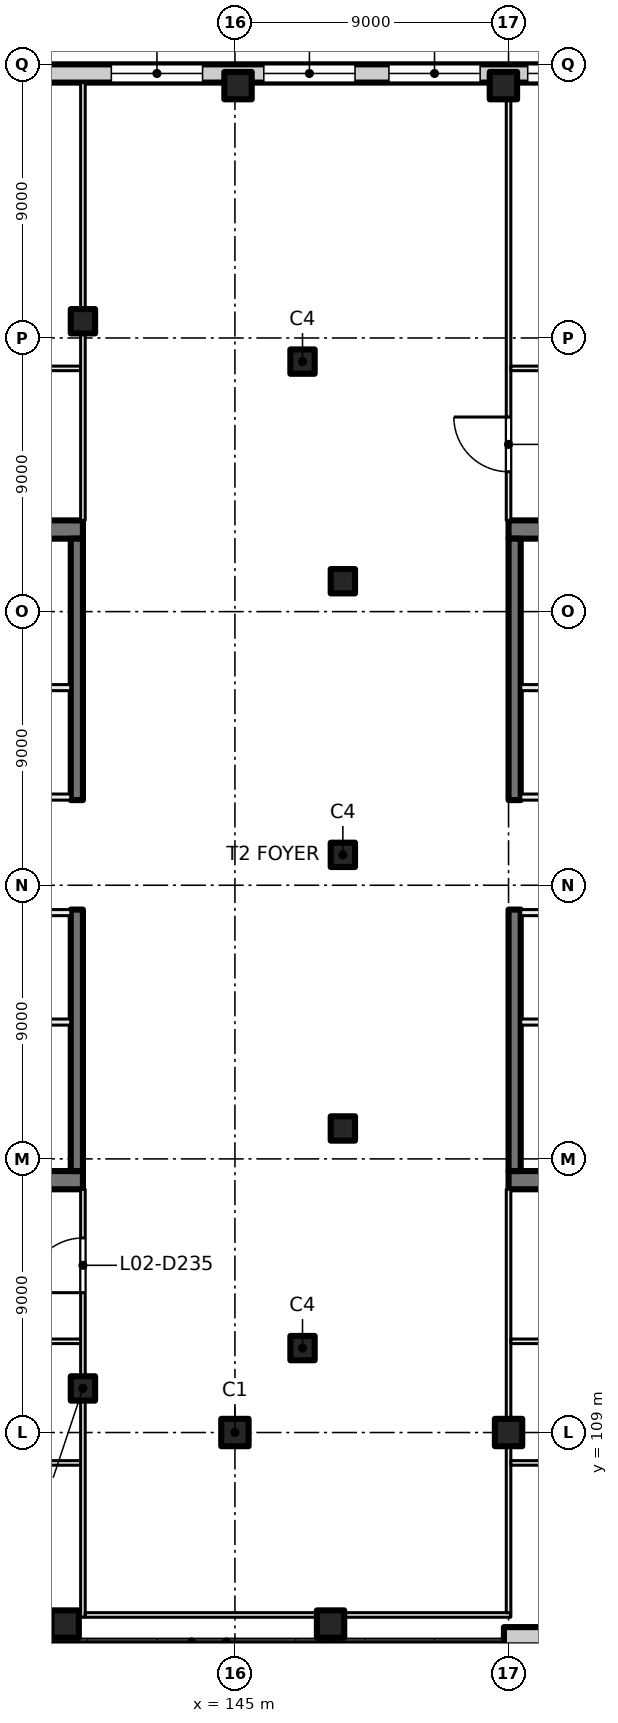
"""IFC4 building model, lengths in metres.
Left out: names, types, materials, properties, quantities, classifications, styles, units other than length and angle.
Written with IfcOpenShell. Run it as: python <this file> out.ifc"""

import sys

from ifc_helpers import new_model, si_unit, direction, frame, frame_2d, origin, origin_2d, place, context, subcontext, project, spatial, rectangle, extrude, element, fill, save


model = new_model("IFC4")
c1 = context("Model", 3, precision=1e-05, world=origin(), true_north=direction((0.0, 1.0)))
c2 = subcontext(c1, "Body", "Model", "MODEL_VIEW")
j1 = project(units=[si_unit("LENGTHUNIT", "METRE"), si_unit("PLANEANGLEUNIT", "RADIAN")], contexts=[c1])
p1 = place(None, origin())
s1 = spatial("IfcSite", under=j1, at=p1, CompositionType="ELEMENT")
p2 = place(p1, origin())
s2 = spatial("IfcBuilding", under=s1, at=p2, CompositionType="ELEMENT")
p3 = place(p2, frame((0.0, 0.0, 12.5)))
s3 = spatial("IfcBuildingStorey", under=s2, at=p3, CompositionType="ELEMENT", Elevation=12.5)
for number, where, z_axis, x_axis in (
    (1, (145.0, 109.0, 0.0), (0.0, 0.0, 1.0), (1.0, 0.0, 0.0)),
    (2, (154.0, 109.0, 0.0), (0.0, 0.0, 1.0), (1.0, 0.0, 0.0)),
    (3, (145.102, 153.3, 0.0), (0.0, 0.0, 1.0), (1.0, 0.0, 0.0)),
    (4, (153.831, 153.3, 0.0), (0.0, 0.0, 1.0), (1.0, 0.0, 0.0)),
    (5, (148.146, 102.7, 0.0), (0.0, 0.0, 1.0), (1.0, 0.0, 0.0)),
    (6, (139.416, 102.7, 0.0), (0.0, 0.0, 1.0), (1.0, 0.0, 0.0)),
):
    element("IfcColumn", number, at=place(p3, frame(where, z_axis=z_axis, x_axis=x_axis)), inside=s3, PredefinedType="COLUMN", context=c2, shape_type="SweptSolid", body=[
        extrude(rectangle(XDim=0.9, YDim=0.9, at=origin_2d()), origin(), (0.0, 0.0, 1.0), 5.0),
    ])
for number, where, z_axis, x_axis in (
    (7, (148.55, 119.0, 0.0), (0.0, 0.0, 1.0), (1.0, 0.0, 0.0)),
    (8, (148.55, 128.0, 0.0), (0.0, 0.0, 1.0), (1.0, 0.0, 0.0)),
    (9, (148.55, 137.0, 0.0), (0.0, 0.0, 1.0), (1.0, 0.0, 0.0)),
    (10, (140.0, 145.55, 0.0), (0.0, 0.0, 1.0), (1.0, 0.0, 0.0)),
    (11, (147.223, 144.223, 0.0), (0.0, 0.0, 1.0), (1.0, 0.0, 0.0)),
    (12, (140.0, 110.45, 0.0), (0.0, 0.0, 1.0), (1.0, 0.0, 0.0)),
    (13, (147.223, 111.777, 0.0), (0.0, 0.0, 1.0), (1.0, 0.0, 0.0)),
):
    element("IfcColumn", number, at=place(p3, frame(where, z_axis=z_axis, x_axis=x_axis)), inside=s3, PredefinedType="COLUMN", context=c2, shape_type="SweptSolid", body=[
        extrude(rectangle(XDim=0.8, YDim=0.8, at=origin_2d()), origin(), (0.0, 0.0, 1.0), 5.0),
    ])
for number, where, z_axis, x_axis in (
    (14, (135.4, 117.3, 0.0), (0.0, 0.0, 1.0), (1.0, 0.0, 0.0)),
    (15, (135.4, 138.7, 0.0), (0.0, 0.0, 1.0), (1.0, 0.0, 0.0)),
):
    element("IfcWall", number, at=place(p3, frame(where, z_axis=z_axis, x_axis=x_axis)), inside=s3, PredefinedType="SHEAR", context=c2, shape_type="SweptSolid", body=[
        extrude(rectangle(XDim=4.6, YDim=0.6, at=frame_2d((2.3, 0.0))), origin(), (0.0, 0.0, 1.0), 5.0),
    ])
for number, where, z_axis, x_axis in (
    (16, (139.8, 117.6, 0.0), (0.0, 0.0, 1.0), (0.0, 1.0, 0.0)),
    (17, (139.8, 129.8, 0.0), (0.0, 0.0, 1.0), (0.0, 1.0, 0.0)),
):
    element("IfcWall", number, at=place(p3, frame(where, z_axis=z_axis, x_axis=x_axis)), inside=s3, PredefinedType="SHEAR", context=c2, shape_type="SweptSolid", body=[
        extrude(rectangle(XDim=8.6, YDim=0.4, at=frame_2d((4.3, 0.0))), origin(), (0.0, 0.0, 1.0), 5.0),
    ])
for number, where, z_axis, x_axis in (
    (18, (158.6, 138.7, 0.0), (0.0, 0.0, 1.0), (-1.0, 0.0, 0.0)),
    (19, (158.6, 117.3, 0.0), (0.0, 0.0, 1.0), (-1.0, 0.0, 0.0)),
):
    element("IfcWall", number, at=place(p3, frame(where, z_axis=z_axis, x_axis=x_axis)), inside=s3, PredefinedType="SHEAR", context=c2, shape_type="SweptSolid", body=[
        extrude(rectangle(XDim=4.6, YDim=0.6, at=frame_2d((2.3, 0.0))), origin(), (0.0, 0.0, 1.0), 5.0),
    ])
for number, where, z_axis, x_axis in (
    (20, (154.2, 138.4, 0.0), (0.0, 0.0, 1.0), (0.0, -1.0, 0.0)),
    (21, (154.2, 126.2, 0.0), (0.0, 0.0, 1.0), (0.0, -1.0, 0.0)),
):
    element("IfcWall", number, at=place(p3, frame(where, z_axis=z_axis, x_axis=x_axis)), inside=s3, PredefinedType="SHEAR", context=c2, shape_type="SweptSolid", body=[
        extrude(rectangle(XDim=8.6, YDim=0.4, at=frame_2d((4.3, 0.0))), origin(), (0.0, 0.0, 1.0), 5.0),
    ])
p4 = place(p3, frame((162.978, 102.3, 0.0), z_axis=(0.0, 0.0, 1.0), x_axis=(-1.0, 0.0, 0.0)))
e22 = element("IfcWall", 22, at=p4, inside=s3, PredefinedType="SOLIDWALL", context=c2, shape_type="SweptSolid", body=[
    extrude(rectangle(XDim=9.13, YDim=0.6, at=frame_2d((4.565, 0.0))), origin(), (0.0, 0.0, 1.0), 4.6),
])
p5 = place(p4, frame((0.783, 0.0, 0.9)))
e23 = element("IfcOpeningElement", 23, at=p5, cuts=e22, PredefinedType="OPENING", context=c2, shape_type="SweptSolid", body=[
    extrude(rectangle(XDim=3.0, YDim=3.0, at=frame_2d((1.5, 1.5))), frame((0.0, 0.31, 0.0), z_axis=(0.0, -1.0, 0.0), x_axis=(1.0, 0.0, 0.0)), (0.0, 0.0, 1.0), 0.62),
])
p6 = place(p3, frame((131.022, 153.7, 0.0), z_axis=(0.0, 0.0, 1.0), x_axis=(1.0, 0.0, 0.0)))
e24 = element("IfcWall", 24, at=p6, inside=s3, PredefinedType="SOLIDWALL", context=c2, shape_type="SweptSolid", body=[
    extrude(rectangle(XDim=31.957, YDim=0.6, at=frame_2d((15.978, 0.0))), origin(), (0.0, 0.0, 1.0), 4.6),
])
p7 = place(p6, frame((0.783, 0.0, 0.9)))
e25 = element("IfcOpeningElement", 25, at=p7, cuts=e24, PredefinedType="OPENING", context=c2, shape_type="SweptSolid", body=[
    extrude(rectangle(XDim=3.0, YDim=3.0, at=frame_2d((1.5, 1.5))), frame((0.0, 0.31, 0.0), z_axis=(0.0, -1.0, 0.0), x_axis=(1.0, 0.0, 0.0)), (0.0, 0.0, 1.0), 0.62),
])
p8 = place(p6, frame((9.913, 0.0, 0.9)))
e26 = element("IfcOpeningElement", 26, at=p8, cuts=e24, PredefinedType="OPENING", context=c2, shape_type="SweptSolid", body=[
    extrude(rectangle(XDim=3.0, YDim=3.0, at=frame_2d((1.5, 1.5))), frame((0.0, 0.31, 0.0), z_axis=(0.0, -1.0, 0.0), x_axis=(1.0, 0.0, 0.0)), (0.0, 0.0, 1.0), 0.62),
])
p9 = place(p6, frame((14.928, 0.0, 0.9)))
e27 = element("IfcOpeningElement", 27, at=p9, cuts=e24, PredefinedType="OPENING", context=c2, shape_type="SweptSolid", body=[
    extrude(rectangle(XDim=3.0, YDim=3.0, at=frame_2d((1.5, 1.5))), frame((0.0, 0.31, 0.0), z_axis=(0.0, -1.0, 0.0), x_axis=(1.0, 0.0, 0.0)), (0.0, 0.0, 1.0), 0.62),
])
p10 = place(p6, frame((19.043, 0.0, 0.9)))
e28 = element("IfcOpeningElement", 28, at=p10, cuts=e24, PredefinedType="OPENING", context=c2, shape_type="SweptSolid", body=[
    extrude(rectangle(XDim=3.0, YDim=3.0, at=frame_2d((1.5, 1.5))), frame((0.0, 0.31, 0.0), z_axis=(0.0, -1.0, 0.0), x_axis=(1.0, 0.0, 0.0)), (0.0, 0.0, 1.0), 0.62),
])
p11 = place(p6, frame((23.609, 0.0, 0.9)))
e29 = element("IfcOpeningElement", 29, at=p11, cuts=e24, PredefinedType="OPENING", context=c2, shape_type="SweptSolid", body=[
    extrude(rectangle(XDim=3.0, YDim=3.0, at=frame_2d((1.5, 1.5))), frame((0.0, 0.31, 0.0), z_axis=(0.0, -1.0, 0.0), x_axis=(1.0, 0.0, 0.0)), (0.0, 0.0, 1.0), 0.62),
])
p12 = place(p6, frame((27.724, 0.0, 0.9)))
e30 = element("IfcOpeningElement", 30, at=p12, cuts=e24, PredefinedType="OPENING", context=c2, shape_type="SweptSolid", body=[
    extrude(rectangle(XDim=3.0, YDim=3.0, at=frame_2d((1.5, 1.5))), frame((0.0, 0.31, 0.0), z_axis=(0.0, -1.0, 0.0), x_axis=(1.0, 0.0, 0.0)), (0.0, 0.0, 1.0), 0.62),
])
p13 = place(p3, frame((135.0, 129.9, 0.0), z_axis=(0.0, 0.0, 1.0), x_axis=(1.0, 0.0, 0.0)))
e31 = element("IfcWall", 31, at=p13, inside=s3, PredefinedType="PARTITIONING", context=c2, shape_type="SweptSolid", body=[
    extrude(rectangle(XDim=4.6, YDim=0.2, at=frame_2d((2.3, 0.0))), origin(), (0.0, 0.0, 1.0), 4.6),
])
p14 = place(p13, frame((1.7, 0.0, 0.0)))
e32 = element("IfcOpeningElement", 32, at=p14, cuts=e31, PredefinedType="OPENING", context=c2, shape_type="SweptSolid", body=[
    extrude(rectangle(XDim=1.2, YDim=2.1, at=frame_2d((0.6, 1.05))), frame((0.0, 0.11, 0.0), z_axis=(0.0, -1.0, 0.0), x_axis=(1.0, 0.0, 0.0)), (0.0, 0.0, 1.0), 0.22),
])
p15 = place(p3, frame((135.0, 133.5, 0.0), z_axis=(0.0, 0.0, 1.0), x_axis=(1.0, 0.0, 0.0)))
e33 = element("IfcWall", 33, at=p15, inside=s3, PredefinedType="PARTITIONING", context=c2, shape_type="SweptSolid", body=[
    extrude(rectangle(XDim=4.6, YDim=0.2, at=frame_2d((2.3, 0.0))), origin(), (0.0, 0.0, 1.0), 4.6),
])
p16 = place(p15, frame((1.75, 0.0, 0.0)))
e34 = element("IfcOpeningElement", 34, at=p16, cuts=e33, PredefinedType="OPENING", context=c2, shape_type="SweptSolid", body=[
    extrude(rectangle(XDim=1.5, YDim=2.1, at=frame_2d((0.75, 1.05))), frame((0.0, 0.11, 0.0), z_axis=(0.0, -1.0, 0.0), x_axis=(1.0, 0.0, 0.0)), (0.0, 0.0, 1.0), 0.22),
])
p17 = place(p3, frame((139.6, 126.1, 0.0), z_axis=(0.0, 0.0, 1.0), x_axis=(-1.0, 0.0, 0.0)))
e35 = element("IfcWall", 35, at=p17, inside=s3, PredefinedType="PARTITIONING", context=c2, shape_type="SweptSolid", body=[
    extrude(rectangle(XDim=4.6, YDim=0.2, at=frame_2d((2.3, 0.0))), origin(), (0.0, 0.0, 1.0), 4.6),
])
p18 = place(p17, frame((1.7, 0.0, 0.0)))
e36 = element("IfcOpeningElement", 36, at=p18, cuts=e35, PredefinedType="OPENING", context=c2, shape_type="SweptSolid", body=[
    extrude(rectangle(XDim=1.2, YDim=2.1, at=frame_2d((0.6, 1.05))), frame((0.0, 0.11, 0.0), z_axis=(0.0, -1.0, 0.0), x_axis=(1.0, 0.0, 0.0)), (0.0, 0.0, 1.0), 0.22),
])
p19 = place(p3, frame((139.6, 122.5, 0.0), z_axis=(0.0, 0.0, 1.0), x_axis=(-1.0, 0.0, 0.0)))
e37 = element("IfcWall", 37, at=p19, inside=s3, PredefinedType="PARTITIONING", context=c2, shape_type="SweptSolid", body=[
    extrude(rectangle(XDim=4.6, YDim=0.2, at=frame_2d((2.3, 0.0))), origin(), (0.0, 0.0, 1.0), 4.6),
])
p20 = place(p19, frame((1.35, 0.0, 0.0)))
e38 = element("IfcOpeningElement", 38, at=p20, cuts=e37, PredefinedType="OPENING", context=c2, shape_type="SweptSolid", body=[
    extrude(rectangle(XDim=1.5, YDim=2.1, at=frame_2d((0.75, 1.05))), frame((0.0, 0.11, 0.0), z_axis=(0.0, -1.0, 0.0), x_axis=(1.0, 0.0, 0.0)), (0.0, 0.0, 1.0), 0.22),
])
p21 = place(p3, frame((163.8, 126.1, 0.0), z_axis=(0.0, 0.0, 1.0), x_axis=(-1.0, 0.0, 0.0)))
e39 = element("IfcWall", 39, at=p21, inside=s3, PredefinedType="PARTITIONING", context=c2, shape_type="SweptSolid", body=[
    extrude(rectangle(XDim=9.4, YDim=0.2, at=frame_2d((4.7, 0.0))), origin(), (0.0, 0.0, 1.0), 4.6),
])
p22 = place(p21, frame((4.1, 0.0, 0.0)))
e40 = element("IfcOpeningElement", 40, at=p22, cuts=e39, PredefinedType="OPENING", context=c2, shape_type="SweptSolid", body=[
    extrude(rectangle(XDim=1.2, YDim=2.1, at=frame_2d((0.6, 1.05))), frame((0.0, 0.11, 0.0), z_axis=(0.0, -1.0, 0.0), x_axis=(1.0, 0.0, 0.0)), (0.0, 0.0, 1.0), 0.22),
])
p23 = place(p3, frame((163.8, 122.5, 0.0), z_axis=(0.0, 0.0, 1.0), x_axis=(-1.0, 0.0, 0.0)))
e41 = element("IfcWall", 41, at=p23, inside=s3, PredefinedType="PARTITIONING", context=c2, shape_type="SweptSolid", body=[
    extrude(rectangle(XDim=9.4, YDim=0.2, at=frame_2d((4.7, 0.0))), origin(), (0.0, 0.0, 1.0), 4.6),
])
p24 = place(p23, frame((6.55, 0.0, 0.0)))
e42 = element("IfcOpeningElement", 42, at=p24, cuts=e41, PredefinedType="OPENING", context=c2, shape_type="SweptSolid", body=[
    extrude(rectangle(XDim=1.5, YDim=2.1, at=frame_2d((0.75, 1.05))), frame((0.0, 0.11, 0.0), z_axis=(0.0, -1.0, 0.0), x_axis=(1.0, 0.0, 0.0)), (0.0, 0.0, 1.0), 0.22),
])
p25 = place(p3, frame((154.4, 129.9, 0.0), z_axis=(0.0, 0.0, 1.0), x_axis=(1.0, 0.0, 0.0)))
e43 = element("IfcWall", 43, at=p25, inside=s3, PredefinedType="PARTITIONING", context=c2, shape_type="SweptSolid", body=[
    extrude(rectangle(XDim=9.4, YDim=0.2, at=frame_2d((4.7, 0.0))), origin(), (0.0, 0.0, 1.0), 4.6),
])
p26 = place(p25, frame((4.1, 0.0, 0.0)))
e44 = element("IfcOpeningElement", 44, at=p26, cuts=e43, PredefinedType="OPENING", context=c2, shape_type="SweptSolid", body=[
    extrude(rectangle(XDim=1.2, YDim=2.1, at=frame_2d((0.6, 1.05))), frame((0.0, 0.11, 0.0), z_axis=(0.0, -1.0, 0.0), x_axis=(1.0, 0.0, 0.0)), (0.0, 0.0, 1.0), 0.22),
])
p27 = place(p3, frame((154.4, 133.5, 0.0), z_axis=(0.0, 0.0, 1.0), x_axis=(1.0, 0.0, 0.0)))
e45 = element("IfcWall", 45, at=p27, inside=s3, PredefinedType="PARTITIONING", context=c2, shape_type="SweptSolid", body=[
    extrude(rectangle(XDim=9.4, YDim=0.2, at=frame_2d((4.7, 0.0))), origin(), (0.0, 0.0, 1.0), 4.6),
])
p28 = place(p27, frame((1.35, 0.0, 0.0)))
e46 = element("IfcOpeningElement", 46, at=p28, cuts=e45, PredefinedType="OPENING", context=c2, shape_type="SweptSolid", body=[
    extrude(rectangle(XDim=1.5, YDim=2.1, at=frame_2d((0.75, 1.05))), frame((0.0, 0.11, 0.0), z_axis=(0.0, -1.0, 0.0), x_axis=(1.0, 0.0, 0.0)), (0.0, 0.0, 1.0), 0.22),
])
p29 = place(p3, frame((119.875, 144.0, 0.0), z_axis=(0.0, 0.0, 1.0), x_axis=(1.0, 0.0, 0.0)))
e47 = element("IfcWall", 47, at=p29, inside=s3, PredefinedType="PARTITIONING", context=c2, shape_type="SweptSolid", body=[
    extrude(rectangle(XDim=20.05, YDim=0.15, at=frame_2d((10.025, 0.0))), origin(), (0.0, 0.0, 1.0), 4.6),
])
p30 = place(p29, frame((13.125, 0.0, 0.0)))
e48 = element("IfcOpeningElement", 48, at=p30, cuts=e47, PredefinedType="OPENING", context=c2, shape_type="SweptSolid", body=[
    extrude(rectangle(XDim=1.0, YDim=2.1, at=frame_2d((0.5, 1.05))), frame((0.0, 0.085, 0.0), z_axis=(0.0, -1.0, 0.0), x_axis=(1.0, 0.0, 0.0)), (0.0, 0.0, 1.0), 0.17),
])
p31 = place(p3, frame((121.368, 108.0, 0.0), z_axis=(0.0, 0.0, 1.0), x_axis=(1.0, 0.0, 0.0)))
e49 = element("IfcWall", 49, at=p31, inside=s3, PredefinedType="PARTITIONING", context=c2, shape_type="SweptSolid", body=[
    extrude(rectangle(XDim=18.557, YDim=0.15, at=frame_2d((9.279, 0.0))), origin(), (0.0, 0.0, 1.0), 4.6),
])
p32 = place(p3, frame((139.925, 112.0, 0.0), z_axis=(0.0, 0.0, 1.0), x_axis=(-1.0, 0.0, 0.0)))
e50 = element("IfcWall", 50, at=p32, inside=s3, PredefinedType="PARTITIONING", context=c2, shape_type="SweptSolid", body=[
    extrude(rectangle(XDim=12.927, YDim=0.15, at=frame_2d((6.463, 0.0))), origin(), (0.0, 0.0, 1.0), 4.6),
])
p33 = place(p32, frame((5.925, 0.0, 0.0)))
e51 = element("IfcOpeningElement", 51, at=p33, cuts=e50, PredefinedType="OPENING", context=c2, shape_type="SweptSolid", body=[
    extrude(rectangle(XDim=1.0, YDim=2.1, at=frame_2d((0.5, 1.05))), frame((0.0, 0.085, 0.0), z_axis=(0.0, -1.0, 0.0), x_axis=(1.0, 0.0, 0.0)), (0.0, 0.0, 1.0), 0.17),
])
p34 = place(p3, frame((140.0, 102.925, 0.0), z_axis=(0.0, 0.0, 1.0), x_axis=(0.0, 1.0, 0.0)))
e52 = element("IfcWall", 52, at=p34, inside=s3, PredefinedType="PARTITIONING", context=c2, shape_type="SweptSolid", body=[
    extrude(rectangle(XDim=14.075, YDim=0.15, at=frame_2d((7.038, 0.0))), origin(), (0.0, 0.0, 1.0), 4.6),
])
p35 = place(p34, frame((10.675, 0.0, 0.0)))
e53 = element("IfcOpeningElement", 53, at=p35, cuts=e52, PredefinedType="OPENING", context=c2, shape_type="SweptSolid", body=[
    extrude(rectangle(XDim=1.8, YDim=2.1, at=frame_2d((0.9, 1.05))), frame((0.0, 0.085, 0.0), z_axis=(0.0, -1.0, 0.0), x_axis=(1.0, 0.0, 0.0)), (0.0, 0.0, 1.0), 0.17),
])
p36 = place(p3, frame((140.075, 103.0, 0.0), z_axis=(0.0, 0.0, 1.0), x_axis=(1.0, 0.0, 0.0)))
e54 = element("IfcWall", 54, at=p36, inside=s3, PredefinedType="PARTITIONING", context=c2, shape_type="SweptSolid", body=[
    extrude(rectangle(XDim=14.0, YDim=0.15, at=frame_2d((7.0, 0.0))), origin(), (0.0, 0.0, 1.0), 4.6),
])
p37 = place(p3, frame((140.0, 139.0, 0.0), z_axis=(0.0, 0.0, 1.0), x_axis=(0.0, 1.0, 0.0)))
e55 = element("IfcWall", 55, at=p37, inside=s3, PredefinedType="PARTITIONING", context=c2, shape_type="SweptSolid", body=[
    extrude(rectangle(XDim=14.4, YDim=0.15, at=frame_2d((7.2, 0.0))), origin(), (0.0, 0.0, 1.0), 4.6),
])
p38 = place(p3, frame((154.0, 103.075, 0.0), z_axis=(0.0, 0.0, 1.0), x_axis=(0.0, 1.0, 0.0)))
e56 = element("IfcWall", 56, at=p38, inside=s3, PredefinedType="PARTITIONING", context=c2, shape_type="SweptSolid", body=[
    extrude(rectangle(XDim=13.925, YDim=0.15, at=frame_2d((6.962, 0.0))), origin(), (0.0, 0.0, 1.0), 4.6),
])
p39 = place(p3, frame((154.075, 108.0, 0.0), z_axis=(0.0, 0.0, 1.0), x_axis=(1.0, 0.0, 0.0)))
e57 = element("IfcWall", 57, at=p39, inside=s3, PredefinedType="PARTITIONING", context=c2, shape_type="SweptSolid", body=[
    extrude(rectangle(XDim=18.557, YDim=0.15, at=frame_2d((9.279, 0.0))), origin(), (0.0, 0.0, 1.0), 4.6),
])
p40 = place(p3, frame((167.002, 112.0, 0.0), z_axis=(0.0, 0.0, 1.0), x_axis=(-1.0, 0.0, 0.0)))
e58 = element("IfcWall", 58, at=p40, inside=s3, PredefinedType="PARTITIONING", context=c2, shape_type="SweptSolid", body=[
    extrude(rectangle(XDim=12.927, YDim=0.15, at=frame_2d((6.463, 0.0))), origin(), (0.0, 0.0, 1.0), 4.6),
])
p41 = place(p40, frame((7.5, 0.0, 0.0)))
e59 = element("IfcOpeningElement", 59, at=p41, cuts=e58, PredefinedType="OPENING", context=c2, shape_type="SweptSolid", body=[
    extrude(rectangle(XDim=1.0, YDim=2.1, at=frame_2d((0.5, 1.05))), frame((0.0, 0.085, 0.0), z_axis=(0.0, -1.0, 0.0), x_axis=(1.0, 0.0, 0.0)), (0.0, 0.0, 1.0), 0.17),
])
p42 = place(p3, frame((154.0, 153.4, 0.0), z_axis=(0.0, 0.0, 1.0), x_axis=(0.0, -1.0, 0.0)))
e60 = element("IfcWall", 60, at=p42, inside=s3, PredefinedType="PARTITIONING", context=c2, shape_type="SweptSolid", body=[
    extrude(rectangle(XDim=14.4, YDim=0.15, at=frame_2d((7.2, 0.0))), origin(), (0.0, 0.0, 1.0), 4.6),
])
p43 = place(p42, frame((11.0, 0.0, 0.0)))
e61 = element("IfcOpeningElement", 61, at=p43, cuts=e60, PredefinedType="OPENING", context=c2, shape_type="SweptSolid", body=[
    extrude(rectangle(XDim=1.8, YDim=2.1, at=frame_2d((0.9, 1.05))), frame((0.0, 0.085, 0.0), z_axis=(0.0, -1.0, 0.0), x_axis=(1.0, 0.0, 0.0)), (0.0, 0.0, 1.0), 0.17),
])
p44 = place(p3, frame((154.075, 144.0, 0.0), z_axis=(0.0, 0.0, 1.0), x_axis=(1.0, 0.0, 0.0)))
e62 = element("IfcWall", 62, at=p44, inside=s3, PredefinedType="PARTITIONING", context=c2, shape_type="SweptSolid", body=[
    extrude(rectangle(XDim=20.05, YDim=0.15, at=frame_2d((10.025, 0.0))), origin(), (0.0, 0.0, 1.0), 4.6),
])
p45 = place(p44, frame((2.427, 0.0, 0.0)))
e63 = element("IfcOpeningElement", 63, at=p45, cuts=e62, PredefinedType="OPENING", context=c2, shape_type="SweptSolid", body=[
    extrude(rectangle(XDim=1.0, YDim=2.1, at=frame_2d((0.5, 1.05))), frame((0.0, 0.085, 0.0), z_axis=(0.0, -1.0, 0.0), x_axis=(1.0, 0.0, 0.0)), (0.0, 0.0, 1.0), 0.17),
])
p46 = place(p44, frame((9.623, 0.0, 0.0)))
e64 = element("IfcOpeningElement", 64, at=p46, cuts=e62, PredefinedType="OPENING", context=c2, shape_type="SweptSolid", body=[
    extrude(rectangle(XDim=1.0, YDim=2.1, at=frame_2d((0.5, 1.05))), frame((0.0, 0.085, 0.0), z_axis=(0.0, -1.0, 0.0), x_axis=(1.0, 0.0, 0.0)), (0.0, 0.0, 1.0), 0.17),
])
p47 = place(p8, origin())
e65 = element("IfcWindow", 65, at=p47, inside=s3, PartitioningType="SINGLE_PANEL", PredefinedType="WINDOW", context=c2, shape_type="SweptSolid", body=[
    extrude(rectangle(XDim=3.0, YDim=3.0, at=frame_2d((1.5, 1.5))), frame((0.0, 0.03, 0.0), z_axis=(0.0, -1.0, 0.0), x_axis=(1.0, 0.0, 0.0)), (0.0, 0.0, 1.0), 0.06),
])
fill(e26, e65)
p48 = place(p9, origin())
e66 = element("IfcWindow", 66, at=p48, inside=s3, PartitioningType="SINGLE_PANEL", PredefinedType="WINDOW", context=c2, shape_type="SweptSolid", body=[
    extrude(rectangle(XDim=3.0, YDim=3.0, at=frame_2d((1.5, 1.5))), frame((0.0, 0.03, 0.0), z_axis=(0.0, -1.0, 0.0), x_axis=(1.0, 0.0, 0.0)), (0.0, 0.0, 1.0), 0.06),
])
fill(e27, e66)
p49 = place(p10, origin())
e67 = element("IfcWindow", 67, at=p49, inside=s3, PartitioningType="SINGLE_PANEL", PredefinedType="WINDOW", context=c2, shape_type="SweptSolid", body=[
    extrude(rectangle(XDim=3.0, YDim=3.0, at=frame_2d((1.5, 1.5))), frame((0.0, 0.03, 0.0), z_axis=(0.0, -1.0, 0.0), x_axis=(1.0, 0.0, 0.0)), (0.0, 0.0, 1.0), 0.06),
])
fill(e28, e67)
p50 = place(p11, origin())
e68 = element("IfcWindow", 68, at=p50, inside=s3, PartitioningType="SINGLE_PANEL", PredefinedType="WINDOW", context=c2, shape_type="SweptSolid", body=[
    extrude(rectangle(XDim=3.0, YDim=3.0, at=frame_2d((1.5, 1.5))), frame((0.0, 0.03, 0.0), z_axis=(0.0, -1.0, 0.0), x_axis=(1.0, 0.0, 0.0)), (0.0, 0.0, 1.0), 0.06),
])
fill(e29, e68)
p51 = place(p35, origin())
e69 = element("IfcDoor", 69, at=p51, inside=s3, OperationType="DOUBLE_DOOR_SINGLE_SWING", PredefinedType="DOOR", context=c2, shape_type="SweptSolid", body=[
    extrude(rectangle(XDim=1.8, YDim=2.1, at=frame_2d((0.9, 1.05))), frame((0.0, 0.025, 0.0), z_axis=(0.0, -1.0, 0.0), x_axis=(1.0, 0.0, 0.0)), (0.0, 0.0, 1.0), 0.05),
])
fill(e53, e69)
p52 = place(p43, origin())
e70 = element("IfcDoor", 70, at=p52, inside=s3, OperationType="DOUBLE_DOOR_SINGLE_SWING", PredefinedType="DOOR", context=c2, shape_type="SweptSolid", body=[
    extrude(rectangle(XDim=1.8, YDim=2.1, at=frame_2d((0.9, 1.05))), frame((0.0, 0.025, 0.0), z_axis=(0.0, -1.0, 0.0), x_axis=(1.0, 0.0, 0.0)), (0.0, 0.0, 1.0), 0.05),
])
fill(e61, e70)
save(model, sys.argv[1])
